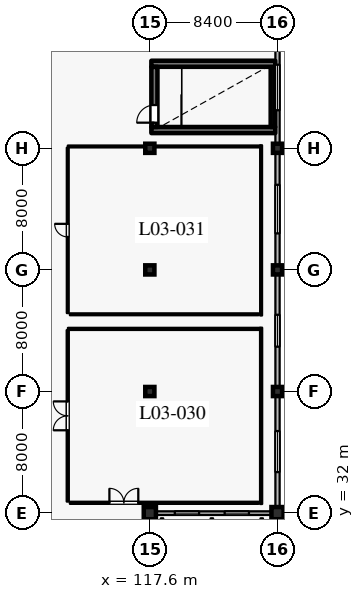
"""IFC4 building model, lengths in metres.
Left out: names, types, materials, properties, quantities, classifications, styles, units other than length and angle.
Written with IfcOpenShell. Run it as: python <this file> out.ifc"""

import sys

from ifc_helpers import new_model, si_unit, direction, frame, frame_2d, origin, origin_2d, place, context, subcontext, project, spatial, rectangle, extrude, element, fill, save


model = new_model("IFC4")
c1 = context("Model", 3, precision=1e-05, world=origin(), true_north=direction((0.0, 1.0)))
c2 = subcontext(c1, "Body", "Model", "MODEL_VIEW")
j1 = project(units=[si_unit("LENGTHUNIT", "METRE"), si_unit("PLANEANGLEUNIT", "RADIAN")], contexts=[c1])
p1 = place(None, origin())
s1 = spatial("IfcSite", under=j1, at=p1, CompositionType="ELEMENT")
p2 = place(p1, origin())
s2 = spatial("IfcBuilding", under=s1, at=p2, CompositionType="ELEMENT")
p3 = place(p2, frame((0.0, 0.0, 16.2)))
s3 = spatial("IfcBuildingStorey", under=s2, at=p3, CompositionType="ELEMENT", Elevation=16.2)
p4 = place(p3, frame((117.6, 32.0, 0.0), z_axis=(0.0, 0.0, 1.0), x_axis=(1.0, 0.0, 0.0)))
e1 = element("IfcColumn", 1, at=p4, inside=s3, PredefinedType="COLUMN", context=c2, shape_type="SweptSolid", body=[
    extrude(rectangle(XDim=0.8, YDim=0.8, at=origin_2d()), origin(), (0.0, 0.0, 1.0), 4.8),
])
for number, where, z_axis, x_axis in (
    (2, (117.6, 40.0, 0.0), (0.0, 0.0, 1.0), (1.0, 0.0, 0.0)),
    (3, (117.6, 48.0, 0.0), (0.0, 0.0, 1.0), (1.0, 0.0, 0.0)),
    (4, (117.6, 56.0, 0.0), (0.0, 0.0, 1.0), (1.0, 0.0, 0.0)),
):
    element("IfcColumn", number, at=place(p3, frame(where, z_axis=z_axis, x_axis=x_axis)), inside=s3, PredefinedType="COLUMN", context=c2, shape_type="SweptSolid", body=[
        extrude(rectangle(XDim=0.6, YDim=0.6, at=origin_2d()), origin(), (0.0, 0.0, 1.0), 4.8),
    ])
p5 = place(p3, frame((126.0, 32.0, 0.0), z_axis=(0.0, 0.0, 1.0), x_axis=(1.0, 0.0, 0.0)))
e5 = element("IfcColumn", 5, at=p5, inside=s3, PredefinedType="COLUMN", context=c2, shape_type="SweptSolid", body=[
    extrude(rectangle(XDim=0.8, YDim=0.8, at=origin_2d()), origin(), (0.0, 0.0, 1.0), 4.8),
])
for number, where, z_axis, x_axis in (
    (6, (126.0, 40.0, 0.0), (0.0, 0.0, 1.0), (1.0, 0.0, 0.0)),
    (7, (126.0, 48.0, 0.0), (0.0, 0.0, 1.0), (1.0, 0.0, 0.0)),
    (8, (126.0, 56.0, 0.0), (0.0, 0.0, 1.0), (1.0, 0.0, 0.0)),
):
    element("IfcColumn", number, at=place(p3, frame(where, z_axis=z_axis, x_axis=x_axis)), inside=s3, PredefinedType="COLUMN", context=c2, shape_type="SweptSolid", body=[
        extrude(rectangle(XDim=0.6, YDim=0.6, at=origin_2d()), origin(), (0.0, 0.0, 1.0), 4.8),
    ])
p6 = place(p3, frame((126.0, 63.7, 0.0), z_axis=(0.0, 0.0, 1.0), x_axis=(0.0, -1.0, 0.0)))
e9 = element("IfcWall", 9, at=p6, inside=s3, PredefinedType="SOLIDWALL", context=c2, shape_type="SweptSolid", body=[
    extrude(rectangle(XDim=7.4, YDim=0.28, at=frame_2d((3.7, 0.0))), origin(), (0.0, 0.0, 1.0), 4.5),
])
p7 = place(p6, frame((2.2, 0.0, 1.0)))
e10 = element("IfcOpeningElement", 10, at=p7, cuts=e9, PredefinedType="OPENING", context=c2, shape_type="SweptSolid", body=[
    extrude(rectangle(XDim=3.0, YDim=2.2, at=frame_2d((1.5, 1.1))), frame((0.0, 0.15, 0.0), z_axis=(0.0, -1.0, 0.0), x_axis=(1.0, 0.0, 0.0)), (0.0, 0.0, 1.0), 0.3),
])
p8 = place(p3, frame((126.0, 55.7, 0.0), z_axis=(0.0, 0.0, 1.0), x_axis=(0.0, -1.0, 0.0)))
e11 = element("IfcWall", 11, at=p8, inside=s3, PredefinedType="SOLIDWALL", context=c2, shape_type="SweptSolid", body=[
    extrude(rectangle(XDim=7.4, YDim=0.28, at=frame_2d((3.7, 0.0))), origin(), (0.0, 0.0, 1.0), 3.84),
])
p9 = place(p8, frame((2.1, 0.0, 1.0)))
e12 = element("IfcOpeningElement", 12, at=p9, cuts=e11, PredefinedType="OPENING", context=c2, shape_type="SweptSolid", body=[
    extrude(rectangle(XDim=3.2, YDim=2.4, at=frame_2d((1.6, 1.2))), frame((0.0, 0.15, 0.0), z_axis=(0.0, -1.0, 0.0), x_axis=(1.0, 0.0, 0.0)), (0.0, 0.0, 1.0), 0.3),
])
p10 = place(p3, frame((126.0, 47.7, 0.0), z_axis=(0.0, 0.0, 1.0), x_axis=(0.0, -1.0, 0.0)))
e13 = element("IfcWall", 13, at=p10, inside=s3, PredefinedType="SOLIDWALL", context=c2, shape_type="SweptSolid", body=[
    extrude(rectangle(XDim=7.4, YDim=0.28, at=frame_2d((3.7, 0.0))), origin(), (0.0, 0.0, 1.0), 3.84),
])
p11 = place(p10, frame((2.65, 0.0, 1.0)))
e14 = element("IfcOpeningElement", 14, at=p11, cuts=e13, PredefinedType="OPENING", context=c2, shape_type="SweptSolid", body=[
    extrude(rectangle(XDim=2.1, YDim=1.1, at=frame_2d((1.05, 0.55))), frame((0.0, 0.15, 0.0), z_axis=(0.0, -1.0, 0.0), x_axis=(1.0, 0.0, 0.0)), (0.0, 0.0, 1.0), 0.3),
])
p12 = place(p3, frame((126.0, 39.7, 0.0), z_axis=(0.0, 0.0, 1.0), x_axis=(0.0, -1.0, 0.0)))
e15 = element("IfcWall", 15, at=p12, inside=s3, PredefinedType="SOLIDWALL", context=c2, shape_type="SweptSolid", body=[
    extrude(rectangle(XDim=7.3, YDim=0.28, at=frame_2d((3.65, 0.0))), origin(), (0.0, 0.0, 1.0), 4.5),
])
p13 = place(p12, frame((2.3, 0.0, 1.0)))
e16 = element("IfcOpeningElement", 16, at=p13, cuts=e15, PredefinedType="OPENING", context=c2, shape_type="SweptSolid", body=[
    extrude(rectangle(XDim=2.7, YDim=1.2, at=frame_2d((1.35, 0.6))), frame((0.0, 0.15, 0.0), z_axis=(0.0, -1.0, 0.0), x_axis=(1.0, 0.0, 0.0)), (0.0, 0.0, 1.0), 0.3),
])
p14 = place(p3, frame((118.0, 32.0, 0.0), z_axis=(0.0, 0.0, 1.0), x_axis=(1.0, 0.0, 0.0)))
e17 = element("IfcWall", 17, at=p14, inside=s3, PredefinedType="SOLIDWALL", context=c2, shape_type="SweptSolid", body=[
    extrude(rectangle(XDim=7.6, YDim=0.24, at=frame_2d((3.8, 0.0))), origin(), (0.0, 0.0, 1.0), 4.09),
])
p15 = place(p14, frame((1.24, 0.0, 0.8)))
e18 = element("IfcOpeningElement", 18, at=p15, cuts=e17, PredefinedType="OPENING", context=c2, shape_type="SweptSolid", body=[
    extrude(rectangle(XDim=1.6, YDim=1.6, at=frame_2d((0.8, 0.8))), frame((0.0, 0.13, 0.0), z_axis=(0.0, -1.0, 0.0), x_axis=(1.0, 0.0, 0.0)), (0.0, 0.0, 1.0), 0.26),
])
p16 = place(p14, frame((4.52, 0.0, 0.8)))
e19 = element("IfcOpeningElement", 19, at=p16, cuts=e17, PredefinedType="OPENING", context=c2, shape_type="SweptSolid", body=[
    extrude(rectangle(XDim=1.6, YDim=1.6, at=frame_2d((0.8, 0.8))), frame((0.0, 0.13, 0.0), z_axis=(0.0, -1.0, 0.0), x_axis=(1.0, 0.0, 0.0)), (0.0, 0.0, 1.0), 0.26),
])
p17 = place(p3, frame((126.4, 32.0, 0.0), z_axis=(0.0, 0.0, 1.0), x_axis=(1.0, 0.0, 0.0)))
e20 = element("IfcWall", 20, at=p17, inside=s3, PredefinedType="SOLIDWALL", context=c2, shape_type="SweptSolid", body=[
    extrude(rectangle(XDim=7.6, YDim=0.24, at=frame_2d((3.8, 0.0))), origin(), (0.0, 0.0, 1.0), 4.09),
])
p18 = place(p17, frame((0.17, 0.0, 0.8)))
e21 = element("IfcOpeningElement", 21, at=p18, cuts=e20, PredefinedType="OPENING", context=c2, shape_type="SweptSolid", body=[
    extrude(rectangle(XDim=1.4, YDim=1.6, at=frame_2d((0.7, 0.8))), frame((0.0, 0.13, 0.0), z_axis=(0.0, -1.0, 0.0), x_axis=(1.0, 0.0, 0.0)), (0.0, 0.0, 1.0), 0.26),
])
p19 = place(p17, frame((2.68, 0.0, 0.8)))
e22 = element("IfcOpeningElement", 22, at=p19, cuts=e20, PredefinedType="OPENING", context=c2, shape_type="SweptSolid", body=[
    extrude(rectangle(XDim=1.6, YDim=1.6, at=frame_2d((0.8, 0.8))), frame((0.0, 0.13, 0.0), z_axis=(0.0, -1.0, 0.0), x_axis=(1.0, 0.0, 0.0)), (0.0, 0.0, 1.0), 0.26),
])
p20 = place(p17, frame((5.61, 0.0, 0.8)))
e23 = element("IfcOpeningElement", 23, at=p20, cuts=e20, PredefinedType="OPENING", context=c2, shape_type="SweptSolid", body=[
    extrude(rectangle(XDim=1.6, YDim=1.6, at=frame_2d((0.8, 0.8))), frame((0.0, 0.13, 0.0), z_axis=(0.0, -1.0, 0.0), x_axis=(1.0, 0.0, 0.0)), (0.0, 0.0, 1.0), 0.26),
])
p21 = place(p3, frame((117.7, 57.2, 0.0), z_axis=(0.0, 0.0, 1.0), x_axis=(1.0, 0.0, 0.0)))
e24 = element("IfcWall", 24, at=p21, inside=s3, PredefinedType="SHEAR", context=c2, shape_type="SweptSolid", body=[
    extrude(rectangle(XDim=8.15, YDim=0.4, at=frame_2d((4.075, 0.0))), origin(), (0.0, 0.0, 1.0), 4.535),
])
p22 = place(p3, frame((125.7, 57.405, 0.0), z_axis=(0.0, 0.0, 1.0), x_axis=(0.0, 1.0, 0.0)))
e25 = element("IfcWall", 25, at=p22, inside=s3, PredefinedType="SHEAR", context=c2, shape_type="SweptSolid", body=[
    extrude(rectangle(XDim=3.95, YDim=0.3, at=frame_2d((1.975, 0.0))), origin(), (0.0, 0.0, 1.0), 4.535),
])
p23 = place(p3, frame((117.7, 61.56, 0.0), z_axis=(0.0, 0.0, 1.0), x_axis=(1.0, 0.0, 0.0)))
e26 = element("IfcWall", 26, at=p23, inside=s3, PredefinedType="SHEAR", context=c2, shape_type="SweptSolid", body=[
    extrude(rectangle(XDim=8.15, YDim=0.4, at=frame_2d((4.075, 0.0))), origin(), (0.0, 0.0, 1.0), 4.535),
])
p24 = place(p3, frame((117.9, 57.405, 0.0), z_axis=(0.0, 0.0, 1.0), x_axis=(0.0, 1.0, 0.0)))
e27 = element("IfcWall", 27, at=p24, inside=s3, PredefinedType="SHEAR", context=c2, shape_type="SweptSolid", body=[
    extrude(rectangle(XDim=3.95, YDim=0.4, at=frame_2d((1.975, 0.0))), origin(), (0.0, 0.0, 1.0), 4.535),
])
p25 = place(p24, frame((0.28, 0.0, 0.0)))
e28 = element("IfcOpeningElement", 28, at=p25, cuts=e27, PredefinedType="OPENING", context=c2, shape_type="SweptSolid", body=[
    extrude(rectangle(XDim=1.16, YDim=2.2, at=frame_2d((0.58, 1.1))), frame((0.0, 0.21, 0.0), z_axis=(0.0, -1.0, 0.0), x_axis=(1.0, 0.0, 0.0)), (0.0, 0.0, 1.0), 0.42),
])
for number, where, z_axis, x_axis in (
    (29, (118.4, 25.16, 0.0), (0.0, 0.0, 1.0), (0.0, 1.0, 0.0)),
    (30, (121.68, 25.16, 0.0), (0.0, 0.0, 1.0), (0.0, 1.0, 0.0)),
    (31, (124.96, 25.16, 0.0), (0.0, 0.0, 1.0), (0.0, 1.0, 0.0)),
):
    element("IfcWall", number, at=place(p3, frame(where, z_axis=z_axis, x_axis=x_axis)), inside=s3, PredefinedType="PARTITIONING", context=c2, shape_type="SweptSolid", body=[
        extrude(rectangle(XDim=6.5, YDim=0.16, at=frame_2d((3.25, 0.0))), origin(), (0.0, 0.0, 1.0), 4.535),
    ])
p26 = place(p3, frame((112.2, 32.76, 0.0), z_axis=(0.0, 0.0, 1.0), x_axis=(0.0, 1.0, 0.0)))
e32 = element("IfcWall", 32, at=p26, inside=s3, PredefinedType="PARTITIONING", context=c2, shape_type="SweptSolid", body=[
    extrude(rectangle(XDim=11.28, YDim=0.14, at=frame_2d((5.64, 0.0))), origin(), (0.0, 0.0, 1.0), 4.535),
])
p27 = place(p26, frame((4.69, 0.0, 0.0)))
e33 = element("IfcOpeningElement", 33, at=p27, cuts=e32, PredefinedType="OPENING", context=c2, shape_type="SweptSolid", body=[
    extrude(rectangle(XDim=1.9, YDim=2.4, at=frame_2d((0.95, 1.2))), frame((0.0, 0.08, 0.0), z_axis=(0.0, -1.0, 0.0), x_axis=(1.0, 0.0, 0.0)), (0.0, 0.0, 1.0), 0.16),
])
p28 = place(p3, frame((112.34, 32.68, 0.0), z_axis=(0.0, 0.0, 1.0), x_axis=(1.0, 0.0, 0.0)))
e34 = element("IfcWall", 34, at=p28, inside=s3, PredefinedType="PARTITIONING", context=c2, shape_type="SweptSolid", body=[
    extrude(rectangle(XDim=12.41, YDim=0.14, at=frame_2d((6.205, 0.0))), origin(), (0.0, 0.0, 1.0), 4.535),
])
p29 = place(p28, frame((2.6, 0.0, 0.0)))
e35 = element("IfcOpeningElement", 35, at=p29, cuts=e34, PredefinedType="OPENING", context=c2, shape_type="SweptSolid", body=[
    extrude(rectangle(XDim=1.9, YDim=2.4, at=frame_2d((0.95, 1.2))), frame((0.0, 0.08, 0.0), z_axis=(0.0, -1.0, 0.0), x_axis=(1.0, 0.0, 0.0)), (0.0, 0.0, 1.0), 0.16),
])
p30 = place(p3, frame((112.2, 45.16, 0.0), z_axis=(0.0, 0.0, 1.0), x_axis=(0.0, 1.0, 0.0)))
e36 = element("IfcWall", 36, at=p30, inside=s3, PredefinedType="PARTITIONING", context=c2, shape_type="SweptSolid", body=[
    extrude(rectangle(XDim=10.88, YDim=0.125, at=frame_2d((5.44, 0.0))), origin(), (0.0, 0.0, 1.0), 4.535),
])
p31 = place(p30, frame((5.01, 0.0, 0.0)))
e37 = element("IfcOpeningElement", 37, at=p31, cuts=e36, PredefinedType="OPENING", context=c2, shape_type="SweptSolid", body=[
    extrude(rectangle(XDim=0.86, YDim=2.12, at=frame_2d((0.43, 1.06))), frame((0.0, 0.073, 0.0), z_axis=(0.0, -1.0, 0.0), x_axis=(1.0, 0.0, 0.0)), (0.0, 0.0, 1.0), 0.145),
])
p32 = place(p3, frame((112.34, 45.08, 0.0), z_axis=(0.0, 0.0, 1.0), x_axis=(1.0, 0.0, 0.0)))
e38 = element("IfcWall", 38, at=p32, inside=s3, PredefinedType="PARTITIONING", context=c2, shape_type="SweptSolid", body=[
    extrude(rectangle(XDim=12.41, YDim=0.125, at=frame_2d((6.205, 0.0))), origin(), (0.0, 0.0, 1.0), 4.535),
])
p33 = place(p3, frame((124.92, 32.6, 0.0), z_axis=(0.0, 0.0, 1.0), x_axis=(0.0, 1.0, 0.0)))
e39 = element("IfcWall", 39, at=p33, inside=s3, PredefinedType="PARTITIONING", context=c2, shape_type="SweptSolid", body=[
    extrude(rectangle(XDim=11.6, YDim=0.14, at=frame_2d((5.8, 0.0))), origin(), (0.0, 0.0, 1.0), 4.535),
])
p34 = place(p3, frame((112.212, 44.12, 0.0), z_axis=(0.0, 0.0, 1.0), x_axis=(1.0, 0.0, 0.0)))
e40 = element("IfcWall", 40, at=p34, inside=s3, PredefinedType="PARTITIONING", context=c2, shape_type="SweptSolid", body=[
    extrude(rectangle(XDim=12.638, YDim=0.14, at=frame_2d((6.319, 0.0))), origin(), (0.0, 0.0, 1.0), 4.535),
])
p35 = place(p3, frame((124.92, 45.0, 0.0), z_axis=(0.0, 0.0, 1.0), x_axis=(0.0, 1.0, 0.0)))
e41 = element("IfcWall", 41, at=p35, inside=s3, PredefinedType="PARTITIONING", context=c2, shape_type="SweptSolid", body=[
    extrude(rectangle(XDim=11.2, YDim=0.125, at=frame_2d((5.6, 0.0))), origin(), (0.0, 0.0, 1.0), 4.535),
])
p36 = place(p3, frame((112.204, 56.12, 0.0), z_axis=(0.0, 0.0, 1.0), x_axis=(1.0, 0.0, 0.0)))
e42 = element("IfcWall", 42, at=p36, inside=s3, PredefinedType="PARTITIONING", context=c2, shape_type="SweptSolid", body=[
    extrude(rectangle(XDim=5.096, YDim=0.125, at=frame_2d((2.548, 0.0))), origin(), (0.0, 0.0, 1.0), 3.84),
])
p37 = place(p3, frame((117.9, 56.12, 0.0), z_axis=(0.0, 0.0, 1.0), x_axis=(1.0, 0.0, 0.0)))
e43 = element("IfcWall", 43, at=p37, inside=s3, PredefinedType="PARTITIONING", context=c2, shape_type="SweptSolid", body=[
    extrude(rectangle(XDim=6.958, YDim=0.125, at=frame_2d((3.479, 0.0))), origin(), (0.0, 0.0, 1.0), 3.84),
])
p38 = place(p7, origin())
e44 = element("IfcWindow", 44, at=p38, inside=s3, PartitioningType="DOUBLE_PANEL_VERTICAL", PredefinedType="WINDOW", context=c2, shape_type="SweptSolid", body=[
    extrude(rectangle(XDim=3.0, YDim=2.2, at=frame_2d((1.5, 1.1))), frame((0.0, 0.03, 0.0), z_axis=(0.0, -1.0, 0.0), x_axis=(1.0, 0.0, 0.0)), (0.0, 0.0, 1.0), 0.06),
])
fill(e10, e44)
p39 = place(p9, origin())
e45 = element("IfcWindow", 45, at=p39, inside=s3, PartitioningType="DOUBLE_PANEL_VERTICAL", PredefinedType="WINDOW", context=c2, shape_type="SweptSolid", body=[
    extrude(rectangle(XDim=3.2, YDim=2.4, at=frame_2d((1.6, 1.2))), frame((0.0, 0.03, 0.0), z_axis=(0.0, -1.0, 0.0), x_axis=(1.0, 0.0, 0.0)), (0.0, 0.0, 1.0), 0.06),
])
fill(e12, e45)
p40 = place(p11, origin())
e46 = element("IfcWindow", 46, at=p40, inside=s3, PartitioningType="DOUBLE_PANEL_VERTICAL", PredefinedType="WINDOW", context=c2, shape_type="SweptSolid", body=[
    extrude(rectangle(XDim=2.1, YDim=1.1, at=frame_2d((1.05, 0.55))), frame((0.0, 0.03, 0.0), z_axis=(0.0, -1.0, 0.0), x_axis=(1.0, 0.0, 0.0)), (0.0, 0.0, 1.0), 0.06),
])
fill(e14, e46)
p41 = place(p13, origin())
e47 = element("IfcWindow", 47, at=p41, inside=s3, PartitioningType="DOUBLE_PANEL_VERTICAL", PredefinedType="WINDOW", context=c2, shape_type="SweptSolid", body=[
    extrude(rectangle(XDim=2.7, YDim=1.2, at=frame_2d((1.35, 0.6))), frame((0.0, 0.03, 0.0), z_axis=(0.0, -1.0, 0.0), x_axis=(1.0, 0.0, 0.0)), (0.0, 0.0, 1.0), 0.06),
])
fill(e16, e47)
p42 = place(p15, origin())
e48 = element("IfcWindow", 48, at=p42, inside=s3, PartitioningType="SINGLE_PANEL", PredefinedType="WINDOW", context=c2, shape_type="SweptSolid", body=[
    extrude(rectangle(XDim=1.6, YDim=1.6, at=frame_2d((0.8, 0.8))), frame((0.0, 0.03, 0.0), z_axis=(0.0, -1.0, 0.0), x_axis=(1.0, 0.0, 0.0)), (0.0, 0.0, 1.0), 0.06),
])
fill(e18, e48)
p43 = place(p16, origin())
e49 = element("IfcWindow", 49, at=p43, inside=s3, PartitioningType="SINGLE_PANEL", PredefinedType="WINDOW", context=c2, shape_type="SweptSolid", body=[
    extrude(rectangle(XDim=1.6, YDim=1.6, at=frame_2d((0.8, 0.8))), frame((0.0, 0.03, 0.0), z_axis=(0.0, -1.0, 0.0), x_axis=(1.0, 0.0, 0.0)), (0.0, 0.0, 1.0), 0.06),
])
fill(e19, e49)
p44 = place(p25, origin())
e50 = element("IfcDoor", 50, at=p44, inside=s3, OperationType="SINGLE_SWING_LEFT", PredefinedType="DOOR", context=c2, shape_type="SweptSolid", body=[
    extrude(rectangle(XDim=1.16, YDim=2.2, at=frame_2d((0.58, 1.1))), frame((0.0, 0.025, 0.0), z_axis=(0.0, -1.0, 0.0), x_axis=(1.0, 0.0, 0.0)), (0.0, 0.0, 1.0), 0.05),
])
fill(e28, e50)
p45 = place(p27, origin())
e51 = element("IfcDoor", 51, at=p45, inside=s3, OperationType="DOUBLE_DOOR_SINGLE_SWING", PredefinedType="DOOR", context=c2, shape_type="SweptSolid", body=[
    extrude(rectangle(XDim=1.9, YDim=2.4, at=frame_2d((0.95, 1.2))), frame((0.0, 0.025, 0.0), z_axis=(0.0, -1.0, 0.0), x_axis=(1.0, 0.0, 0.0)), (0.0, 0.0, 1.0), 0.05),
])
fill(e33, e51)
p46 = place(p31, origin())
e52 = element("IfcDoor", 52, at=p46, inside=s3, OperationType="SINGLE_SWING_RIGHT", PredefinedType="DOOR", context=c2, shape_type="SweptSolid", body=[
    extrude(rectangle(XDim=0.86, YDim=2.12, at=frame_2d((0.43, 1.06))), frame((0.0, 0.025, 0.0), z_axis=(0.0, -1.0, 0.0), x_axis=(1.0, 0.0, 0.0)), (0.0, 0.0, 1.0), 0.05),
])
fill(e37, e52)
p47 = place(p29, origin())
e53 = element("IfcDoor", 53, at=p47, inside=s3, OperationType="DOUBLE_DOOR_SINGLE_SWING", PredefinedType="DOOR", context=c2, shape_type="SweptSolid", body=[
    extrude(rectangle(XDim=1.9, YDim=2.4, at=frame_2d((0.95, 1.2))), frame((0.0, 0.025, 0.0), z_axis=(0.0, -1.0, 0.0), x_axis=(1.0, 0.0, 0.0)), (0.0, 0.0, 1.0), 0.05),
])
fill(e35, e53)
save(model, sys.argv[1])
